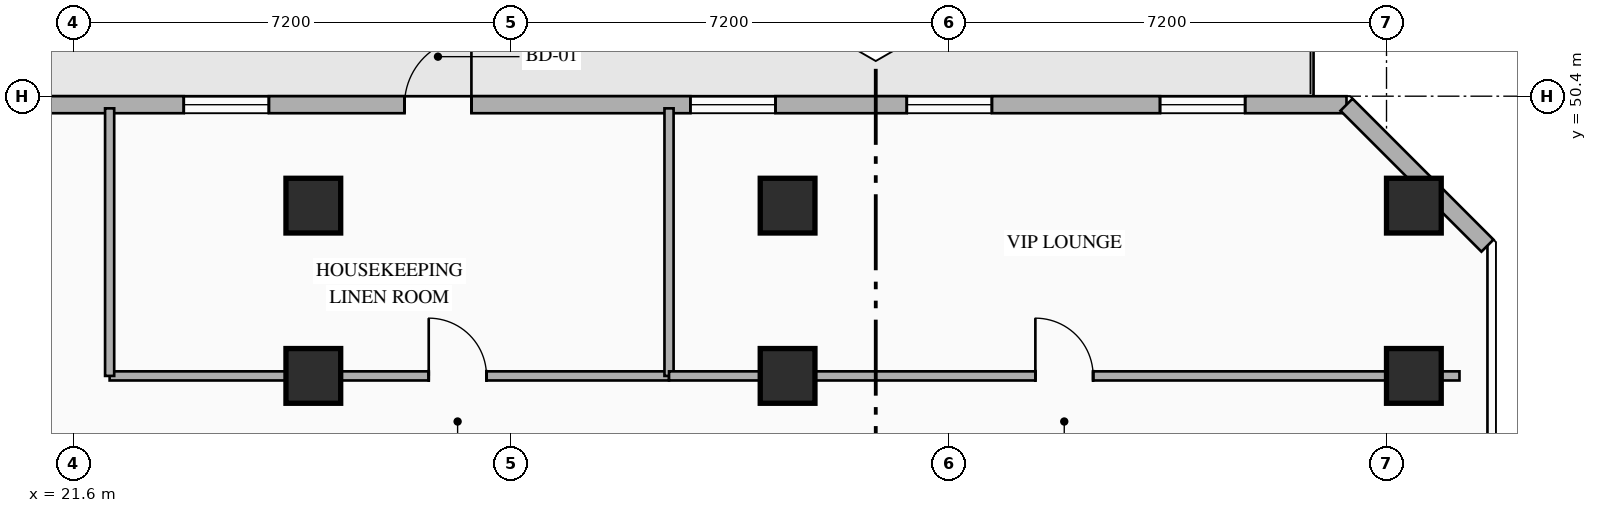
"""IFC4 building model, lengths in metres.
Left out: names, types, materials, properties, quantities, classifications, styles, units other than length and angle.
Written with IfcOpenShell. Run it as: python <this file> out.ifc"""

import sys

from ifc_helpers import new_model, si_unit, direction, frame, frame_2d, origin, origin_2d, place, context, subcontext, project, spatial, rectangle, hollow_rectangle, extrude, element, fill, save


model = new_model("IFC4")
c1 = context("Model", 3, precision=1e-05, world=origin(), true_north=direction((0.0, 1.0)))
c2 = subcontext(c1, "Body", "Model", "MODEL_VIEW")
j1 = project(units=[si_unit("LENGTHUNIT", "METRE"), si_unit("PLANEANGLEUNIT", "RADIAN")], contexts=[c1])
p1 = place(None, origin())
s1 = spatial("IfcSite", under=j1, at=p1, CompositionType="ELEMENT")
p2 = place(p1, origin())
s2 = spatial("IfcBuilding", under=s1, at=p2, CompositionType="ELEMENT")
p3 = place(p2, frame((0.0, 0.0, 84.65)))
s3 = spatial("IfcBuildingStorey", under=s2, at=p3, CompositionType="ELEMENT", Elevation=84.65)
for number, where, z_axis, x_axis in (
    (1, (25.55, 45.8, 0.0), (0.0, 0.0, 1.0), (1.0, 0.0, 0.0)),
    (2, (33.35, 45.8, 0.0), (0.0, 0.0, 1.0), (1.0, 0.0, 0.0)),
    (3, (43.65, 45.8, 0.0), (0.0, 0.0, 1.0), (1.0, 0.0, 0.0)),
    (4, (25.55, 48.6, 0.0), (0.0, 0.0, 1.0), (1.0, 0.0, 0.0)),
    (5, (33.35, 48.6, 0.0), (0.0, 0.0, 1.0), (1.0, 0.0, 0.0)),
    (6, (43.65, 48.6, 0.0), (0.0, 0.0, 1.0), (1.0, 0.0, 0.0)),
):
    element("IfcColumn", number, at=place(p3, frame(where, z_axis=z_axis, x_axis=x_axis)), inside=s3, PredefinedType="COLUMN", context=c2, shape_type="SweptSolid", body=[
        extrude(hollow_rectangle(XDim=0.9, YDim=0.9, WallThickness=0.036, at=origin_2d()), origin(), (0.0, 0.0, 1.0), 3.35),
    ])
p4 = place(p3, frame((12.058, 50.26, 0.0), z_axis=(0.0, 0.0, 1.0), x_axis=(1.0, 0.0, 0.0)))
e7 = element("IfcWall", 7, at=p4, inside=s3, PredefinedType="STANDARD", context=c2, shape_type="SweptSolid", body=[
    extrude(rectangle(XDim=30.484, YDim=0.28, at=frame_2d((15.242, 0.0))), origin(), (0.0, 0.0, 1.0), 3.13),
])
p5 = place(p4, frame((14.992, 0.0, 0.0)))
e8 = element("IfcOpeningElement", 8, at=p5, cuts=e7, PredefinedType="OPENING", context=c2, shape_type="SweptSolid", body=[
    extrude(rectangle(XDim=1.1, YDim=2.2, at=frame_2d((0.55, 1.1))), frame((0.0, 0.15, 0.0), z_axis=(0.0, -1.0, 0.0), x_axis=(1.0, 0.0, 0.0)), (0.0, 0.0, 1.0), 0.3),
])
p6 = place(p4, frame((0.653, 0.0, 0.85)))
e9 = element("IfcOpeningElement", 9, at=p6, cuts=e7, PredefinedType="OPENING", context=c2, shape_type="SweptSolid", body=[
    extrude(rectangle(XDim=1.4, YDim=1.8, at=frame_2d((0.7, 0.9))), frame((0.0, 0.15, 0.0), z_axis=(0.0, -1.0, 0.0), x_axis=(1.0, 0.0, 0.0)), (0.0, 0.0, 1.0), 0.3),
])
p7 = place(p4, frame((4.435, 0.0, 0.85)))
e10 = element("IfcOpeningElement", 10, at=p7, cuts=e7, PredefinedType="OPENING", context=c2, shape_type="SweptSolid", body=[
    extrude(rectangle(XDim=1.4, YDim=1.8, at=frame_2d((0.7, 0.9))), frame((0.0, 0.15, 0.0), z_axis=(0.0, -1.0, 0.0), x_axis=(1.0, 0.0, 0.0)), (0.0, 0.0, 1.0), 0.3),
])
p8 = place(p4, frame((11.361, 0.0, 0.85)))
e11 = element("IfcOpeningElement", 11, at=p8, cuts=e7, PredefinedType="OPENING", context=c2, shape_type="SweptSolid", body=[
    extrude(rectangle(XDim=1.4, YDim=1.8, at=frame_2d((0.7, 0.9))), frame((0.0, 0.15, 0.0), z_axis=(0.0, -1.0, 0.0), x_axis=(1.0, 0.0, 0.0)), (0.0, 0.0, 1.0), 0.3),
])
p9 = place(p4, frame((19.693, 0.0, 0.85)))
e12 = element("IfcOpeningElement", 12, at=p9, cuts=e7, PredefinedType="OPENING", context=c2, shape_type="SweptSolid", body=[
    extrude(rectangle(XDim=1.4, YDim=1.8, at=frame_2d((0.7, 0.9))), frame((0.0, 0.15, 0.0), z_axis=(0.0, -1.0, 0.0), x_axis=(1.0, 0.0, 0.0)), (0.0, 0.0, 1.0), 0.3),
])
p10 = place(p4, frame((23.252, 0.0, 0.85)))
e13 = element("IfcOpeningElement", 13, at=p10, cuts=e7, PredefinedType="OPENING", context=c2, shape_type="SweptSolid", body=[
    extrude(rectangle(XDim=1.4, YDim=1.8, at=frame_2d((0.7, 0.9))), frame((0.0, 0.15, 0.0), z_axis=(0.0, -1.0, 0.0), x_axis=(1.0, 0.0, 0.0)), (0.0, 0.0, 1.0), 0.3),
])
p11 = place(p4, frame((27.417, 0.0, 0.85)))
e14 = element("IfcOpeningElement", 14, at=p11, cuts=e7, PredefinedType="OPENING", context=c2, shape_type="SweptSolid", body=[
    extrude(rectangle(XDim=1.4, YDim=1.8, at=frame_2d((0.7, 0.9))), frame((0.0, 0.15, 0.0), z_axis=(0.0, -1.0, 0.0), x_axis=(1.0, 0.0, 0.0)), (0.0, 0.0, 1.0), 0.3),
])
p12 = place(p3, frame((42.542, 50.26, 0.0), z_axis=(0.0, 0.0, 1.0), x_axis=(0.707106781187, -0.707106781187, 0.0)))
e15 = element("IfcWall", 15, at=p12, inside=s3, PredefinedType="STANDARD", context=c2, shape_type="SweptSolid", body=[
    extrude(rectangle(XDim=3.278, YDim=0.28, at=frame_2d((1.639, 0.0))), origin(), (0.0, 0.0, 1.0), 3.13),
])
p13 = place(p3, frame((22.2, 45.8, 0.0), z_axis=(0.0, 0.0, 1.0), x_axis=(1.0, 0.0, 0.0)))
e16 = element("IfcWall", 16, at=p13, inside=s3, PredefinedType="PARTITIONING", context=c2, shape_type="SweptSolid", body=[
    extrude(rectangle(XDim=9.2, YDim=0.15, at=frame_2d((4.6, 0.0))), origin(), (0.0, 0.0, 1.0), 2.425),
])
p14 = place(p13, frame((5.248, 0.0, 0.0)))
e17 = element("IfcOpeningElement", 17, at=p14, cuts=e16, PredefinedType="OPENING", context=c2, shape_type="SweptSolid", body=[
    extrude(rectangle(XDim=0.95, YDim=2.15, at=frame_2d((0.475, 1.075))), frame((0.0, 0.085, 0.0), z_axis=(0.0, -1.0, 0.0), x_axis=(1.0, 0.0, 0.0)), (0.0, 0.0, 1.0), 0.17),
])
for number, where, z_axis, x_axis in (
    (18, (22.2, 45.8, 0.0), (0.0, 0.0, 1.0), (0.0, 1.0, 0.0)),
    (19, (31.4, 45.8, 0.0), (0.0, 0.0, 1.0), (0.0, 1.0, 0.0)),
):
    element("IfcWall", number, at=place(p3, frame(where, z_axis=z_axis, x_axis=x_axis)), inside=s3, PredefinedType="PARTITIONING", context=c2, shape_type="SweptSolid", body=[
        extrude(rectangle(XDim=4.4, YDim=0.15, at=frame_2d((2.2, 0.0))), origin(), (0.0, 0.0, 1.0), 3.13),
    ])
p15 = place(p3, frame((31.4, 45.8, 0.0), z_axis=(0.0, 0.0, 1.0), x_axis=(1.0, 0.0, 0.0)))
e20 = element("IfcWall", 20, at=p15, inside=s3, PredefinedType="PARTITIONING", context=c2, shape_type="SweptSolid", body=[
    extrude(rectangle(XDim=13.0, YDim=0.15, at=frame_2d((6.5, 0.0))), origin(), (0.0, 0.0, 1.0), 2.425),
])
p16 = place(p15, frame((6.025, 0.0, 0.0)))
e21 = element("IfcOpeningElement", 21, at=p16, cuts=e20, PredefinedType="OPENING", context=c2, shape_type="SweptSolid", body=[
    extrude(rectangle(XDim=0.95, YDim=2.15, at=frame_2d((0.475, 1.075))), frame((0.0, 0.085, 0.0), z_axis=(0.0, -1.0, 0.0), x_axis=(1.0, 0.0, 0.0)), (0.0, 0.0, 1.0), 0.17),
])
p17 = place(p5, origin())
e22 = element("IfcDoor", 22, at=p17, inside=s3, OperationType="SINGLE_SWING_RIGHT", PredefinedType="DOOR", context=c2, shape_type="SweptSolid", body=[
    extrude(rectangle(XDim=1.1, YDim=2.2, at=frame_2d((0.55, 1.1))), frame((0.0, 0.025, 0.0), z_axis=(0.0, -1.0, 0.0), x_axis=(1.0, 0.0, 0.0)), (0.0, 0.0, 1.0), 0.05),
])
fill(e8, e22)
p18 = place(p8, origin())
e23 = element("IfcWindow", 23, at=p18, inside=s3, PartitioningType="SINGLE_PANEL", PredefinedType="WINDOW", context=c2, shape_type="SweptSolid", body=[
    extrude(rectangle(XDim=1.4, YDim=1.8, at=frame_2d((0.7, 0.9))), frame((0.0, 0.03, 0.0), z_axis=(0.0, -1.0, 0.0), x_axis=(1.0, 0.0, 0.0)), (0.0, 0.0, 1.0), 0.06),
])
fill(e11, e23)
p19 = place(p9, origin())
e24 = element("IfcWindow", 24, at=p19, inside=s3, PartitioningType="SINGLE_PANEL", PredefinedType="WINDOW", context=c2, shape_type="SweptSolid", body=[
    extrude(rectangle(XDim=1.4, YDim=1.8, at=frame_2d((0.7, 0.9))), frame((0.0, 0.03, 0.0), z_axis=(0.0, -1.0, 0.0), x_axis=(1.0, 0.0, 0.0)), (0.0, 0.0, 1.0), 0.06),
])
fill(e12, e24)
p20 = place(p10, origin())
e25 = element("IfcWindow", 25, at=p20, inside=s3, PartitioningType="SINGLE_PANEL", PredefinedType="WINDOW", context=c2, shape_type="SweptSolid", body=[
    extrude(rectangle(XDim=1.4, YDim=1.8, at=frame_2d((0.7, 0.9))), frame((0.0, 0.03, 0.0), z_axis=(0.0, -1.0, 0.0), x_axis=(1.0, 0.0, 0.0)), (0.0, 0.0, 1.0), 0.06),
])
fill(e13, e25)
p21 = place(p11, origin())
e26 = element("IfcWindow", 26, at=p21, inside=s3, PartitioningType="SINGLE_PANEL", PredefinedType="WINDOW", context=c2, shape_type="SweptSolid", body=[
    extrude(rectangle(XDim=1.4, YDim=1.8, at=frame_2d((0.7, 0.9))), frame((0.0, 0.03, 0.0), z_axis=(0.0, -1.0, 0.0), x_axis=(1.0, 0.0, 0.0)), (0.0, 0.0, 1.0), 0.06),
])
fill(e14, e26)
p22 = place(p14, origin())
e27 = element("IfcDoor", 27, at=p22, inside=s3, OperationType="SINGLE_SWING_LEFT", PredefinedType="DOOR", context=c2, shape_type="SweptSolid", body=[
    extrude(rectangle(XDim=0.95, YDim=2.15, at=frame_2d((0.475, 1.075))), frame((0.0, 0.025, 0.0), z_axis=(0.0, -1.0, 0.0), x_axis=(1.0, 0.0, 0.0)), (0.0, 0.0, 1.0), 0.05),
])
fill(e17, e27)
p23 = place(p16, origin())
e28 = element("IfcDoor", 28, at=p23, inside=s3, OperationType="SINGLE_SWING_LEFT", PredefinedType="DOOR", context=c2, shape_type="SweptSolid", body=[
    extrude(rectangle(XDim=0.95, YDim=2.15, at=frame_2d((0.475, 1.075))), frame((0.0, 0.025, 0.0), z_axis=(0.0, -1.0, 0.0), x_axis=(1.0, 0.0, 0.0)), (0.0, 0.0, 1.0), 0.05),
])
fill(e21, e28)
save(model, sys.argv[1])
